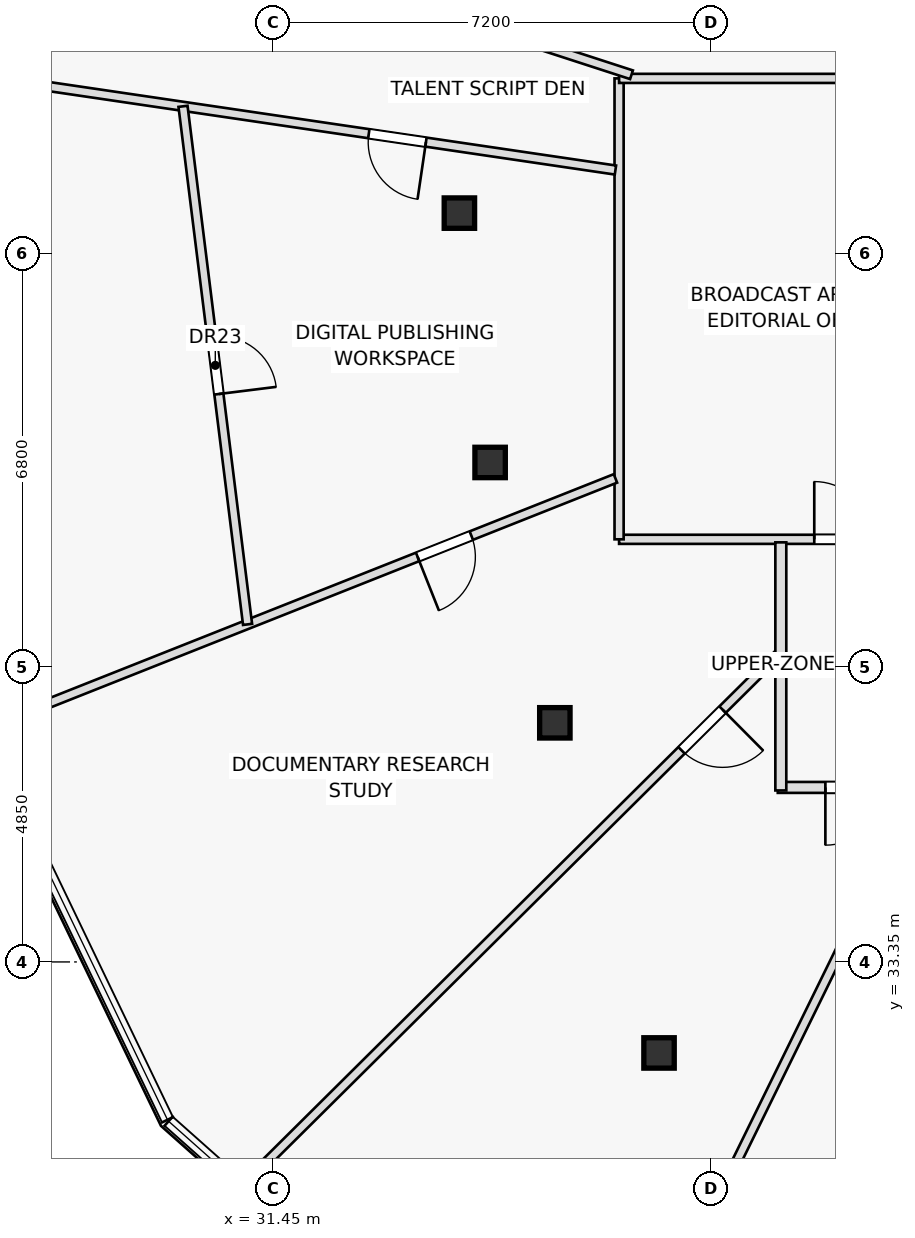
"""IFC4 building model, lengths in metres.
Left out: names, types, materials, properties, quantities, classifications, styles, units other than length and angle.
Written with IfcOpenShell. Run it as: python <this file> out.ifc"""

import sys

from ifc_helpers import new_model, si_unit, direction, frame, frame_2d, origin, origin_2d, place, context, subcontext, project, spatial, rectangle, hollow_rectangle, extrude, element, fill, save


model = new_model("IFC4")
c1 = context("Model", 3, precision=1e-05, world=origin(), true_north=direction((0.0, 1.0)))
c2 = subcontext(c1, "Body", "Model", "MODEL_VIEW")
j1 = project(units=[si_unit("LENGTHUNIT", "METRE"), si_unit("PLANEANGLEUNIT", "RADIAN")], contexts=[c1])
p1 = place(None, origin())
s1 = spatial("IfcSite", under=j1, at=p1, CompositionType="ELEMENT")
p2 = place(p1, origin())
s2 = spatial("IfcBuilding", under=s1, at=p2, CompositionType="ELEMENT")
p3 = place(p2, frame((0.0, 0.0, 261.65)))
s3 = spatial("IfcBuildingStorey", under=s2, at=p3, CompositionType="ELEMENT", Elevation=261.65)
for number, where, z_axis, x_axis in (
    (1, (34.514, 45.665, 0.0), (0.0, 0.0, 1.0), (1.0, 0.0, 0.0)),
    (2, (35.019, 41.564, 0.0), (0.0, 0.0, 1.0), (1.0, 0.0, 0.0)),
    (3, (36.083, 37.282, 0.0), (0.0, 0.0, 1.0), (1.0, 0.0, 0.0)),
    (4, (37.797, 31.853, 0.0), (0.0, 0.0, 1.0), (1.0, 0.0, 0.0)),
):
    element("IfcColumn", number, at=place(p3, frame(where, z_axis=z_axis, x_axis=x_axis)), inside=s3, PredefinedType="COLUMN", context=c2, shape_type="SweptSolid", body=[
        extrude(hollow_rectangle(XDim=0.5, YDim=0.5, WallThickness=0.03, at=origin_2d()), origin(), (0.0, 0.0, 1.0), 3.65),
    ])
p4 = place(p3, frame((37.14, 40.3, 0.0), z_axis=(0.0, 0.0, 1.0), x_axis=(1.0, 0.0, 0.0)))
e5 = element("IfcWall", 5, at=p4, inside=s3, PredefinedType="PARTITIONING", context=c2, shape_type="SweptSolid", body=[
    extrude(rectangle(XDim=5.76, YDim=0.15, at=frame_2d((2.88, 0.0))), origin(), (0.0, 0.0, 1.0), 3.075),
])
p5 = place(p4, frame((3.21, 0.0, 0.0)))
e6 = element("IfcOpeningElement", 6, at=p5, cuts=e5, PredefinedType="OPENING", context=c2, shape_type="SweptSolid", body=[
    extrude(rectangle(XDim=0.95, YDim=2.05, at=frame_2d((0.475, 1.025))), frame((0.0, 0.085, 0.0), z_axis=(0.0, -1.0, 0.0), x_axis=(1.0, 0.0, 0.0)), (0.0, 0.0, 1.0), 0.17),
])
p6 = place(p3, frame((37.14, 40.3, 0.0), z_axis=(0.0, 0.0, 1.0), x_axis=(0.0, 1.0, 0.0)))
e7 = element("IfcWall", 7, at=p6, inside=s3, PredefinedType="PARTITIONING", context=c2, shape_type="SweptSolid", body=[
    extrude(rectangle(XDim=7.58, YDim=0.15, at=frame_2d((3.79, 0.0))), origin(), (0.0, 0.0, 1.0), 3.65),
])
p7 = place(p3, frame((37.14, 47.88, 0.0), z_axis=(0.0, 0.0, 1.0), x_axis=(1.0, 0.0, 0.0)))
e8 = element("IfcWall", 8, at=p7, inside=s3, PredefinedType="PARTITIONING", context=c2, shape_type="SweptSolid", body=[
    extrude(rectangle(XDim=5.76, YDim=0.15, at=frame_2d((2.88, 0.0))), origin(), (0.0, 0.0, 1.0), 3.075),
])
p8 = place(p3, frame((37.344, 47.94, 0.0), z_axis=(0.0, 0.0, 1.0), x_axis=(-0.951130517785, 0.308789148348, 0.0)))
e9 = element("IfcWall", 9, at=p8, inside=s3, PredefinedType="PARTITIONING", context=c2, shape_type="SweptSolid", body=[
    extrude(rectangle(XDim=13.034, YDim=0.15, at=frame_2d((6.517, 0.0))), origin(), (0.0, 0.0, 1.0), 3.175),
])
p9 = place(p3, frame((37.08, 46.373, 0.0), z_axis=(0.0, 0.0, 1.0), x_axis=(-0.989321908316, 0.145746909836, 0.0)))
e10 = element("IfcWall", 10, at=p9, inside=s3, PredefinedType="PARTITIONING", context=c2, shape_type="SweptSolid", body=[
    extrude(rectangle(XDim=12.394, YDim=0.15, at=frame_2d((6.197, 0.0))), origin(), (0.0, 0.0, 1.0), 3.075),
])
p10 = place(p9, frame((3.15, 0.0, 0.0)))
e11 = element("IfcOpeningElement", 11, at=p10, cuts=e10, PredefinedType="OPENING", context=c2, shape_type="SweptSolid", body=[
    extrude(rectangle(XDim=0.95, YDim=2.05, at=frame_2d((0.475, 1.025))), frame((0.0, 0.085, 0.0), z_axis=(0.0, -1.0, 0.0), x_axis=(1.0, 0.0, 0.0)), (0.0, 0.0, 1.0), 0.17),
])
p11 = place(p3, frame((37.08, 41.302, 0.0), z_axis=(0.0, 0.0, 1.0), x_axis=(-0.929496393642, -0.368831200154, 0.0)))
e12 = element("IfcWall", 12, at=p11, inside=s3, PredefinedType="PARTITIONING", context=c2, shape_type="SweptSolid", body=[
    extrude(rectangle(XDim=11.222, YDim=0.15, at=frame_2d((5.611, 0.0))), origin(), (0.0, 0.0, 1.0), 3.075),
])
p12 = place(p11, frame((2.55, 0.0, 0.0)))
e13 = element("IfcOpeningElement", 13, at=p12, cuts=e12, PredefinedType="OPENING", context=c2, shape_type="SweptSolid", body=[
    extrude(rectangle(XDim=0.95, YDim=2.05, at=frame_2d((0.475, 1.025))), frame((0.0, 0.085, 0.0), z_axis=(0.0, -1.0, 0.0), x_axis=(1.0, 0.0, 0.0)), (0.0, 0.0, 1.0), 0.17),
])
p13 = place(p3, frame((39.8, 38.45, 0.0), z_axis=(0.0, 0.0, 1.0), x_axis=(-0.709807958625, -0.704395245493, 0.0)))
e14 = element("IfcWall", 14, at=p13, inside=s3, PredefinedType="PARTITIONING", context=c2, shape_type="SweptSolid", body=[
    extrude(rectangle(XDim=12.494, YDim=0.15, at=frame_2d((6.247, 0.0))), origin(), (0.0, 0.0, 1.0), 3.075),
])
p14 = place(p13, frame((1.35, 0.0, 0.0)))
e15 = element("IfcOpeningElement", 15, at=p14, cuts=e14, PredefinedType="OPENING", context=c2, shape_type="SweptSolid", body=[
    extrude(rectangle(XDim=0.95, YDim=2.05, at=frame_2d((0.475, 1.025))), frame((0.0, 0.085, 0.0), z_axis=(0.0, -1.0, 0.0), x_axis=(1.0, 0.0, 0.0)), (0.0, 0.0, 1.0), 0.17),
])
p15 = place(p3, frame((42.092, 36.22, 0.0), z_axis=(0.0, 0.0, 1.0), x_axis=(-0.440463459743, -0.897770538964, 0.0)))
e16 = element("IfcWall", 16, at=p15, inside=s3, PredefinedType="PARTITIONING", context=c2, shape_type="SweptSolid", body=[
    extrude(rectangle(XDim=13.031, YDim=0.15, at=frame_2d((6.515, 0.0))), origin(), (0.0, 0.0, 1.0), 3.175),
])
p16 = place(p3, frame((29.968, 47.421, 0.0), z_axis=(0.0, 0.0, 1.0), x_axis=(0.123667248189, -0.992323743405, 0.0)))
e17 = element("IfcWall", 17, at=p16, inside=s3, PredefinedType="PARTITIONING", context=c2, shape_type="SweptSolid", body=[
    extrude(rectangle(XDim=8.586, YDim=0.15, at=frame_2d((4.293, 0.0))), origin(), (0.0, 0.0, 1.0), 3.65),
])
p17 = place(p16, frame((3.818, 0.0, 0.0)))
e18 = element("IfcOpeningElement", 18, at=p17, cuts=e17, PredefinedType="OPENING", context=c2, shape_type="SweptSolid", body=[
    extrude(rectangle(XDim=0.95, YDim=2.05, at=frame_2d((0.475, 1.025))), frame((0.0, 0.085, 0.0), z_axis=(0.0, -1.0, 0.0), x_axis=(1.0, 0.0, 0.0)), (0.0, 0.0, 1.0), 0.17),
])
p18 = place(p3, frame((59.23, 36.22, 0.0), z_axis=(0.0, 0.0, 1.0), x_axis=(-1.0, 0.0, 0.0)))
e19 = element("IfcWall", 19, at=p18, inside=s3, PredefinedType="PARTITIONING", context=c2, shape_type="SweptSolid", body=[
    extrude(rectangle(XDim=19.48, YDim=0.18, at=frame_2d((9.74, 0.0))), origin(), (0.0, 0.0, 1.0), 3.075),
])
p19 = place(p18, frame((4.071, 0.0, 0.0)))
e20 = element("IfcOpeningElement", 20, at=p19, cuts=e19, PredefinedType="OPENING", context=c2, shape_type="SweptSolid", body=[
    extrude(rectangle(XDim=0.95, YDim=2.05, at=frame_2d((0.475, 1.025))), frame((0.0, 0.1, 0.0), z_axis=(0.0, -1.0, 0.0), x_axis=(1.0, 0.0, 0.0)), (0.0, 0.0, 1.0), 0.2),
])
p20 = place(p18, frame((8.583, 0.0, 0.0)))
e21 = element("IfcOpeningElement", 21, at=p20, cuts=e19, PredefinedType="OPENING", context=c2, shape_type="SweptSolid", body=[
    extrude(rectangle(XDim=0.95, YDim=2.05, at=frame_2d((0.475, 1.025))), frame((0.0, 0.1, 0.0), z_axis=(0.0, -1.0, 0.0), x_axis=(1.0, 0.0, 0.0)), (0.0, 0.0, 1.0), 0.2),
])
p21 = place(p18, frame((13.372, 0.0, 0.0)))
e22 = element("IfcOpeningElement", 22, at=p21, cuts=e19, PredefinedType="OPENING", context=c2, shape_type="SweptSolid", body=[
    extrude(rectangle(XDim=0.95, YDim=2.05, at=frame_2d((0.475, 1.025))), frame((0.0, 0.1, 0.0), z_axis=(0.0, -1.0, 0.0), x_axis=(1.0, 0.0, 0.0)), (0.0, 0.0, 1.0), 0.2),
])
p22 = place(p18, frame((17.747, 0.0, 0.0)))
e23 = element("IfcOpeningElement", 23, at=p22, cuts=e19, PredefinedType="OPENING", context=c2, shape_type="SweptSolid", body=[
    extrude(rectangle(XDim=0.95, YDim=2.05, at=frame_2d((0.475, 1.025))), frame((0.0, 0.1, 0.0), z_axis=(0.0, -1.0, 0.0), x_axis=(1.0, 0.0, 0.0)), (0.0, 0.0, 1.0), 0.2),
])
p23 = place(p3, frame((39.8, 36.17, 0.0), z_axis=(0.0, 0.0, 1.0), x_axis=(0.0, 1.0, 0.0)))
e24 = element("IfcWall", 24, at=p23, inside=s3, PredefinedType="PARTITIONING", context=c2, shape_type="SweptSolid", body=[
    extrude(rectangle(XDim=4.08, YDim=0.18, at=frame_2d((2.04, 0.0))), origin(), (0.0, 0.0, 1.0), 3.355),
])
p24 = place(p5, origin())
e25 = element("IfcDoor", 25, at=p24, inside=s3, OperationType="SINGLE_SWING_LEFT", PredefinedType="DOOR", context=c2, shape_type="SweptSolid", body=[
    extrude(rectangle(XDim=0.95, YDim=2.05, at=frame_2d((0.475, 1.025))), frame((0.0, 0.025, 0.0), z_axis=(0.0, -1.0, 0.0), x_axis=(1.0, 0.0, 0.0)), (0.0, 0.0, 1.0), 0.05),
])
fill(e6, e25)
p25 = place(p10, origin())
e26 = element("IfcDoor", 26, at=p25, inside=s3, OperationType="SINGLE_SWING_LEFT", PredefinedType="DOOR", context=c2, shape_type="SweptSolid", body=[
    extrude(rectangle(XDim=0.95, YDim=2.05, at=frame_2d((0.475, 1.025))), frame((0.0, 0.025, 0.0), z_axis=(0.0, -1.0, 0.0), x_axis=(1.0, 0.0, 0.0)), (0.0, 0.0, 1.0), 0.05),
])
fill(e11, e26)
p26 = place(p12, origin())
e27 = element("IfcDoor", 27, at=p26, inside=s3, OperationType="SINGLE_SWING_RIGHT", PredefinedType="DOOR", context=c2, shape_type="SweptSolid", body=[
    extrude(rectangle(XDim=0.95, YDim=2.05, at=frame_2d((0.475, 1.025))), frame((0.0, 0.025, 0.0), z_axis=(0.0, -1.0, 0.0), x_axis=(1.0, 0.0, 0.0)), (0.0, 0.0, 1.0), 0.05),
])
fill(e13, e27)
p27 = place(p14, origin())
e28 = element("IfcDoor", 28, at=p27, inside=s3, OperationType="SINGLE_SWING_LEFT", PredefinedType="DOOR", context=c2, shape_type="SweptSolid", body=[
    extrude(rectangle(XDim=0.95, YDim=2.05, at=frame_2d((0.475, 1.025))), frame((0.0, 0.025, 0.0), z_axis=(0.0, -1.0, 0.0), x_axis=(1.0, 0.0, 0.0)), (0.0, 0.0, 1.0), 0.05),
])
fill(e15, e28)
p28 = place(p17, origin())
e29 = element("IfcDoor", 29, at=p28, inside=s3, OperationType="SINGLE_SWING_RIGHT", PredefinedType="DOOR", context=c2, shape_type="SweptSolid", body=[
    extrude(rectangle(XDim=0.95, YDim=2.05, at=frame_2d((0.475, 1.025))), frame((0.0, 0.025, 0.0), z_axis=(0.0, -1.0, 0.0), x_axis=(1.0, 0.0, 0.0)), (0.0, 0.0, 1.0), 0.05),
])
fill(e18, e29)
p29 = place(p22, origin())
e30 = element("IfcDoor", 30, at=p29, inside=s3, OperationType="SINGLE_SWING_RIGHT", PredefinedType="DOOR", context=c2, shape_type="SweptSolid", body=[
    extrude(rectangle(XDim=0.95, YDim=2.05, at=frame_2d((0.475, 1.025))), frame((0.0, 0.025, 0.0), z_axis=(0.0, -1.0, 0.0), x_axis=(1.0, 0.0, 0.0)), (0.0, 0.0, 1.0), 0.05),
])
fill(e23, e30)
save(model, sys.argv[1])
